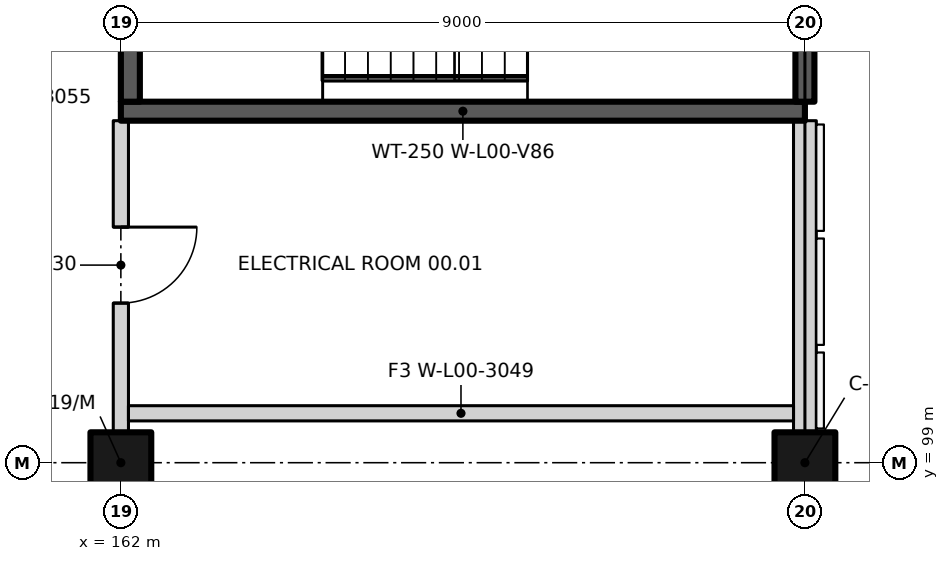
"""IFC4 building model, lengths in metres.
Left out: names, types, materials, properties, quantities, classifications, styles, units other than length and angle.
Written with IfcOpenShell. Run it as: python <this file> out.ifc"""

import sys

from ifc_helpers import new_model, si_unit, direction, frame, frame_2d, origin, origin_2d, place, context, subcontext, project, spatial, rectangle, extrude, element, fill, save


model = new_model("IFC4")
c1 = context("Model", 3, precision=1e-05, world=origin(), true_north=direction((0.0, 1.0)))
c2 = subcontext(c1, "Body", "Model", "MODEL_VIEW")
j1 = project(units=[si_unit("LENGTHUNIT", "METRE"), si_unit("PLANEANGLEUNIT", "RADIAN")], contexts=[c1])
p1 = place(None, origin())
s1 = spatial("IfcSite", under=j1, at=p1, CompositionType="ELEMENT")
p2 = place(p1, origin())
s2 = spatial("IfcBuilding", under=s1, at=p2, CompositionType="ELEMENT")
p3 = place(p2, origin())
s3 = spatial("IfcBuildingStorey", under=s2, at=p3, CompositionType="ELEMENT", Elevation=0.0)
for number, where, z_axis, x_axis in (
    (1, (162.0, 99.0, 0.0), (0.0, 0.0, 1.0), (1.0, 0.0, 0.0)),
    (2, (171.0, 99.0, 0.0), (0.0, 0.0, 1.0), (1.0, 0.0, 0.0)),
):
    element("IfcColumn", number, at=place(p3, frame(where, z_axis=z_axis, x_axis=x_axis)), inside=s3, PredefinedType="COLUMN", context=c2, shape_type="SweptSolid", body=[
        extrude(rectangle(XDim=0.8, YDim=0.8, at=origin_2d()), origin(), (0.0, 0.0, 1.0), 6.0),
    ])
p4 = place(p3, frame((162.0, 103.625, 0.0), z_axis=(0.0, 0.0, 1.0), x_axis=(1.0, 0.0, 0.0)))
e3 = element("IfcWall", 3, at=p4, inside=s3, PredefinedType="SHEAR", context=c2, shape_type="SweptSolid", body=[
    extrude(rectangle(XDim=9.0, YDim=0.25, at=frame_2d((4.5, 0.0))), origin(), (0.0, 0.0, 1.0), 6.0),
])
p5 = place(p3, frame((162.125, 103.75, 0.0), z_axis=(0.0, 0.0, 1.0), x_axis=(0.0, 1.0, 0.0)))
e4 = element("IfcWall", 4, at=p5, inside=s3, PredefinedType="SHEAR", context=c2, shape_type="SweptSolid", body=[
    extrude(rectangle(XDim=3.85, YDim=0.25, at=frame_2d((1.925, 0.0))), origin(), (0.0, 0.0, 1.0), 6.0),
])
p6 = place(p5, frame((2.9, 0.0, 0.0), z_axis=(0.0, 0.0, 1.0), x_axis=(-1.0, 0.0, 0.0)))
e5 = element("IfcOpeningElement", 5, at=p6, cuts=e4, PredefinedType="OPENING", context=c2, shape_type="SweptSolid", body=[
    extrude(rectangle(XDim=1.8, YDim=2.1, at=frame_2d((0.9, 1.05))), frame((0.0, 0.135, 0.0), z_axis=(0.0, -1.0, 0.0), x_axis=(1.0, 0.0, 0.0)), (0.0, 0.0, 1.0), 0.27),
])
p7 = place(p3, frame((171.0, 103.75, 0.0), z_axis=(0.0, 0.0, 1.0), x_axis=(0.0, 1.0, 0.0)))
e6 = element("IfcWall", 6, at=p7, inside=s3, PredefinedType="SHEAR", context=c2, shape_type="SweptSolid", body=[
    extrude(rectangle(XDim=2.062, YDim=0.25, at=frame_2d((1.031, 0.0))), origin(), (0.0, 0.0, 1.0), 6.0),
])
p8 = place(p3, frame((171.0, 103.5, 0.0), z_axis=(0.0, 0.0, 1.0), x_axis=(0.0, -1.0, 0.0)))
e7 = element("IfcWall", 7, at=p8, inside=s3, PredefinedType="SOLIDWALL", context=c2, shape_type="SweptSolid", body=[
    extrude(rectangle(XDim=4.1, YDim=0.3, at=frame_2d((2.05, 0.0))), origin(), (0.0, 0.0, 1.0), 5.2),
])
p9 = place(p3, frame((162.0, 99.4, 0.0), z_axis=(0.0, 0.0, 1.0), x_axis=(0.0, 1.0, 0.0)))
e8 = element("IfcWall", 8, at=p9, inside=s3, PredefinedType="PARTITIONING", context=c2, shape_type="SweptSolid", body=[
    extrude(rectangle(XDim=4.1, YDim=0.2, at=frame_2d((2.05, 0.0))), origin(), (0.0, 0.0, 1.0), 5.7),
])
p10 = place(p9, frame((2.7, 0.0, 0.0), z_axis=(0.0, 0.0, 1.0), x_axis=(-1.0, 0.0, 0.0)))
e9 = element("IfcOpeningElement", 9, at=p10, cuts=e8, PredefinedType="OPENING", context=c2, shape_type="SweptSolid", body=[
    extrude(rectangle(XDim=1.0, YDim=2.1, at=frame_2d((0.5, 1.05))), frame((0.0, 0.11, 0.0), z_axis=(0.0, -1.0, 0.0), x_axis=(1.0, 0.0, 0.0)), (0.0, 0.0, 1.0), 0.22),
])
p11 = place(p3, frame((162.1, 99.65, 0.0), z_axis=(0.0, 0.0, 1.0), x_axis=(1.0, 0.0, 0.0)))
e10 = element("IfcWall", 10, at=p11, inside=s3, PredefinedType="PARTITIONING", context=c2, shape_type="SweptSolid", body=[
    extrude(rectangle(XDim=8.75, YDim=0.2, at=frame_2d((4.375, 0.0))), origin(), (0.0, 0.0, 1.0), 5.7),
])
p12 = place(p10, origin())
e11 = element("IfcDoor", 11, at=p12, inside=s3, OperationType="SINGLE_SWING_LEFT", PredefinedType="DOOR", context=c2, shape_type="SweptSolid", body=[
    extrude(rectangle(XDim=1.0, YDim=2.1, at=frame_2d((0.5, 1.05))), frame((0.0, 0.025, 0.0), z_axis=(0.0, -1.0, 0.0), x_axis=(1.0, 0.0, 0.0)), (0.0, 0.0, 1.0), 0.05),
])
fill(e9, e11)
save(model, sys.argv[1])
